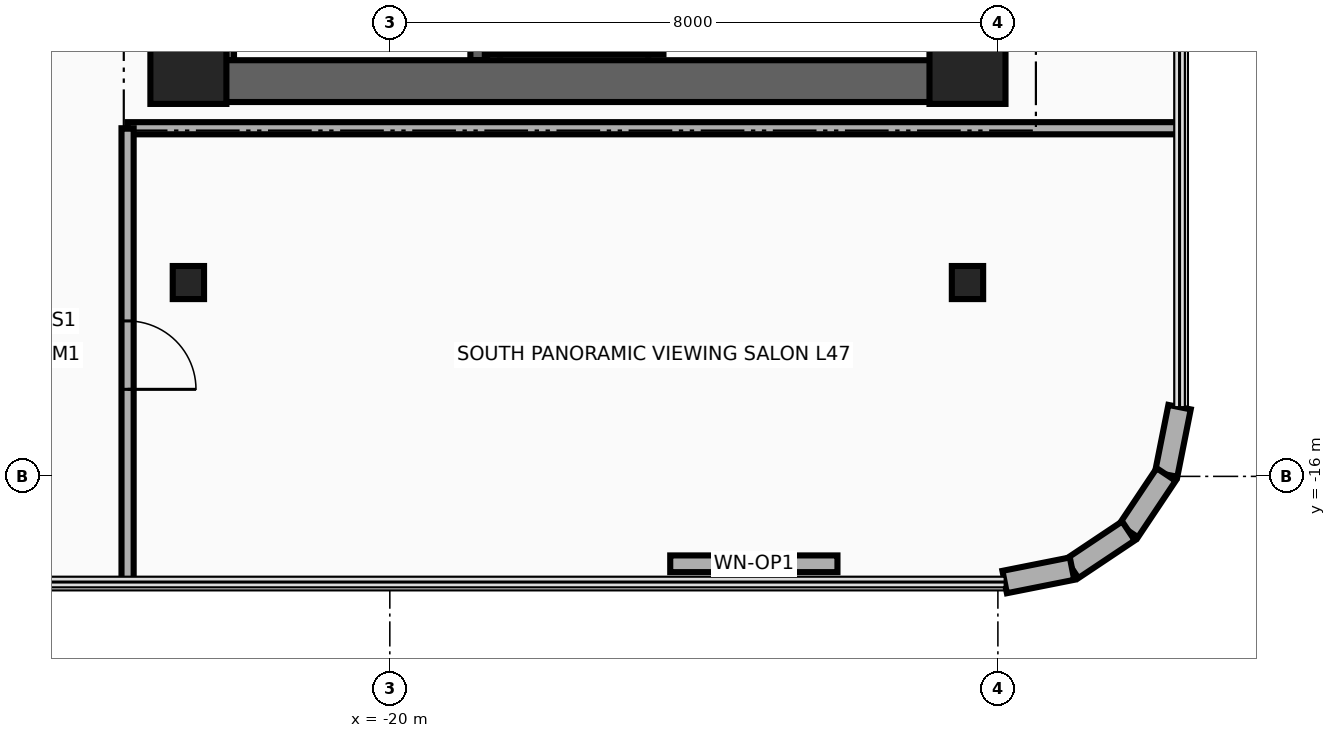
"""IFC4 building model, lengths in metres.
Left out: names, types, materials, properties, quantities, classifications, styles, units other than length and angle.
Written with IfcOpenShell. Run it as: python <this file> out.ifc"""

import sys

from ifc_helpers import new_model, si_unit, direction, frame, frame_2d, origin, origin_2d, place, context, subcontext, project, spatial, rectangle, i_section, extrude, source, transform, mapped, element, fill, save


model = new_model("IFC4")
c1 = context("Model", 3, precision=1e-05, world=origin(), true_north=direction((0.0, 1.0)))
c2 = subcontext(c1, "Body", "Model", "MODEL_VIEW")
j1 = project(units=[si_unit("LENGTHUNIT", "METRE"), si_unit("PLANEANGLEUNIT", "RADIAN")], contexts=[c1])
p1 = place(None, origin())
s1 = spatial("IfcSite", under=j1, at=p1, CompositionType="ELEMENT")
p2 = place(p1, origin())
s2 = spatial("IfcBuilding", under=s1, at=p2, CompositionType="ELEMENT")
p3 = place(p2, frame((0.0, 0.0, 184.45)))
s3 = spatial("IfcBuildingStorey", under=s2, at=p3, CompositionType="ELEMENT", Elevation=184.45)
for number, where, z_axis, x_axis in (
    (1, (-22.16, -10.525, 0.0), (0.0, 0.0, 1.0), (0.0, 1.0, 0.0)),
    (2, (-18.83, -10.525, 0.0), (0.0, 0.0, 1.0), (0.0, 1.0, 0.0)),
):
    element("IfcWall", number, at=place(p3, frame(where, z_axis=z_axis, x_axis=x_axis)), inside=s3, PredefinedType="SHEAR", context=c2, shape_type="SweptSolid", body=[
        extrude(rectangle(XDim=8.745, YDim=0.22, at=frame_2d((4.373, 0.0))), origin(), (0.0, 0.0, 1.0), 3.63),
    ])
p4 = place(p3, frame((-22.65, -11.075, 0.0), z_axis=(0.0, 0.0, 1.0), x_axis=(0.0, 1.0, 0.0)))
e3 = element("IfcWall", 3, at=p4, inside=s3, PredefinedType="SHEAR", context=c2, shape_type="SweptSolid", body=[
    extrude(rectangle(XDim=22.15, YDim=0.55, at=frame_2d((11.075, 0.0))), origin(), (0.0, 0.0, 1.0), 3.63),
])
p5 = place(p3, frame((-22.65, -10.8, 0.0), z_axis=(0.0, 0.0, 1.0), x_axis=(1.0, 0.0, 0.0)))
e4 = element("IfcWall", 4, at=p5, inside=s3, PredefinedType="SHEAR", context=c2, shape_type="SweptSolid", body=[
    extrude(rectangle(XDim=10.25, YDim=0.55, at=frame_2d((5.125, 0.0))), origin(), (0.0, 0.0, 1.0), 3.63),
])
m1 = source(origin(), c2, "Body", "SweptSolid", [
    extrude(rectangle(XDim=1.0, YDim=1.0, at=origin_2d()), origin(), (0.0, 0.0, 1.0), 3.95),
])
for number, where, z_axis, x_axis in (
    (5, (-22.65, -10.6, 0.0), (0.0, 0.0, 1.0), (1.0, 0.0, 0.0)),
    (6, (-12.4, -10.6, 0.0), (0.0, 0.0, 1.0), (1.0, 0.0, 0.0)),
):
    element("IfcColumn", number, at=place(p3, frame(where, z_axis=z_axis, x_axis=x_axis)), inside=s3, PredefinedType="COLUMN", context=c2, shape_type="MappedRepresentation", body=[
        mapped(m1, transform((0.0, 0.0, 0.0), x_axis=(1.0, 0.0, 0.0), y_axis=(0.0, 1.0, 0.0), z_axis=(0.0, 0.0, 1.0), scale=1.0)),
    ])
m2 = source(origin(), c2, "Body", "SweptSolid", [
    extrude(i_section(OverallWidth=0.412, OverallDepth=0.435, WebThickness=0.036, FlangeThickness=0.057, at=origin_2d()), origin(), (0.0, 0.0, 1.0), 3.95),
])
for number, where, z_axis, x_axis in (
    (7, (-22.65, -13.45, 0.0), (0.0, 0.0, 1.0), (1.0, 0.0, 0.0)),
    (8, (-12.4, -13.45, 0.0), (0.0, 0.0, 1.0), (1.0, 0.0, 0.0)),
):
    element("IfcColumn", number, at=place(p3, frame(where, z_axis=z_axis, x_axis=x_axis)), inside=s3, PredefinedType="COLUMN", context=c2, shape_type="MappedRepresentation", body=[
        mapped(m2, transform((0.0, 0.0, 0.0), x_axis=(1.0, 0.0, 0.0), y_axis=(0.0, 1.0, 0.0), z_axis=(0.0, 0.0, 1.0), scale=1.0)),
    ])
p6 = place(p3, frame((-9.61, -15.089, 0.0), z_axis=(0.0, 0.0, 1.0), x_axis=(-0.195025152871, -0.980798241101, 0.0)))
e9 = element("IfcWall", 9, at=p6, inside=s3, PredefinedType="SOLIDWALL", context=c2, shape_type="SweptSolid", body=[
    extrude(rectangle(XDim=0.904, YDim=0.3, at=frame_2d((0.452, 0.0))), origin(), (0.0, 0.0, 1.0), 3.63),
])
for number, where, z_axis, x_axis in (
    (10, (-9.786, -15.976, 0.0), (0.0, 0.0, 1.0), (-0.556, -0.832, 0.0)),
    (11, (-10.282, -16.718, 0.0), (0.0, 0.0, 1.0), (-0.832, -0.556, 0.0)),
):
    element("IfcWall", number, at=place(p3, frame(where, z_axis=z_axis, x_axis=x_axis)), inside=s3, PredefinedType="SOLIDWALL", context=c2, shape_type="SweptSolid", body=[
        extrude(rectangle(XDim=0.893, YDim=0.3, at=frame_2d((0.446, 0.0))), origin(), (0.0, 0.0, 1.0), 3.63),
    ])
p7 = place(p3, frame((-11.024, -17.214, 0.0), z_axis=(0.0, 0.0, 1.0), x_axis=(-0.980798241101, -0.195025152871, 0.0)))
e12 = element("IfcWall", 12, at=p7, inside=s3, PredefinedType="SOLIDWALL", context=c2, shape_type="SweptSolid", body=[
    extrude(rectangle(XDim=0.904, YDim=0.3, at=frame_2d((0.452, 0.0))), origin(), (0.0, 0.0, 1.0), 3.63),
])
p8 = place(p3, frame((-14.111, -17.15, 0.0), z_axis=(0.0, 0.0, 1.0), x_axis=(-1.0, 0.0, 0.0)))
e13 = element("IfcWall", 13, at=p8, inside=s3, PredefinedType="SOLIDWALL", context=c2, shape_type="SweptSolid", body=[
    extrude(rectangle(XDim=2.2, YDim=0.22, at=frame_2d((1.1, 0.0))), origin(), (0.0, 0.0, 1.0), 3.63),
])
p9 = place(p8, frame((0.65, 0.0, 0.95)))
e14 = element("IfcOpeningElement", 14, at=p9, cuts=e13, PredefinedType="OPENING", context=c2, shape_type="SweptSolid", body=[
    extrude(rectangle(XDim=0.9, YDim=1.3, at=frame_2d((0.45, 0.65))), frame((0.0, 0.125, 0.0), z_axis=(0.0, -1.0, 0.0), x_axis=(1.0, 0.0, 0.0)), (0.0, 0.0, 1.0), 0.25),
])
for number, where, z_axis, x_axis in (
    (15, (-18.65, -10.45, 0.0), (0.0, 0.0, 1.0), (0.0, 1.0, 0.0)),
    (16, (-16.5, -10.45, 0.0), (0.0, 0.0, 1.0), (0.0, 1.0, 0.0)),
):
    element("IfcWall", number, at=place(p3, frame(where, z_axis=z_axis, x_axis=x_axis)), inside=s3, PredefinedType="MOVABLE", context=c2, shape_type="SweptSolid", body=[
        extrude(rectangle(XDim=2.35, YDim=0.2, at=frame_2d((1.175, 0.0))), origin(), (0.0, 0.0, 1.0), 2.665),
    ])
p10 = place(p3, frame((-18.55, -10.35, 0.0), z_axis=(0.0, 0.0, 1.0), x_axis=(1.0, 0.0, 0.0)))
e17 = element("IfcWall", 17, at=p10, inside=s3, PredefinedType="MOVABLE", context=c2, shape_type="SweptSolid", body=[
    extrude(rectangle(XDim=1.95, YDim=0.2, at=frame_2d((0.975, 0.0))), origin(), (0.0, 0.0, 1.0), 2.665),
])
p11 = place(p3, frame((-23.45, -11.42, 0.0), z_axis=(0.0, 0.0, 1.0), x_axis=(1.0, 0.0, 0.0)))
e18 = element("IfcWall", 18, at=p11, inside=s3, PredefinedType="PARTITIONING", context=c2, shape_type="SweptSolid", body=[
    extrude(rectangle(XDim=13.84, YDim=0.16, at=frame_2d((6.92, 0.0))), origin(), (0.0, 0.0, 1.0), 3.004),
])
p12 = place(p3, frame((-23.45, -17.39, 0.0), z_axis=(0.0, 0.0, 1.0), x_axis=(0.0, 1.0, 0.0)))
e19 = element("IfcWall", 19, at=p12, inside=s3, PredefinedType="PARTITIONING", context=c2, shape_type="SweptSolid", body=[
    extrude(rectangle(XDim=5.97, YDim=0.16, at=frame_2d((2.985, 0.0))), origin(), (0.0, 0.0, 1.0), 3.63),
])
p13 = place(p12, frame((2.535, 0.0, 0.0)))
e20 = element("IfcOpeningElement", 20, at=p13, cuts=e19, PredefinedType="OPENING", context=c2, shape_type="SweptSolid", body=[
    extrude(rectangle(XDim=0.9, YDim=2.1, at=frame_2d((0.45, 1.05))), frame((0.0, 0.095, 0.0), z_axis=(0.0, -1.0, 0.0), x_axis=(1.0, 0.0, 0.0)), (0.0, 0.0, 1.0), 0.19),
])
p14 = place(p9, origin())
e21 = element("IfcWindow", 21, at=p14, inside=s3, PartitioningType="SINGLE_PANEL", PredefinedType="WINDOW", context=c2, shape_type="SweptSolid", body=[
    extrude(rectangle(XDim=0.9, YDim=1.3, at=frame_2d((0.45, 0.65))), frame((0.0, 0.03, 0.0), z_axis=(0.0, -1.0, 0.0), x_axis=(1.0, 0.0, 0.0)), (0.0, 0.0, 1.0), 0.06),
])
fill(e14, e21)
p15 = place(p13, frame((0.9, 0.0, 0.0), z_axis=(0.0, 0.0, 1.0), x_axis=(-1.0, 0.0, 0.0)))
e22 = element("IfcDoor", 22, at=p15, inside=s3, OperationType="SINGLE_SWING_LEFT", PredefinedType="DOOR", context=c2, shape_type="SweptSolid", body=[
    extrude(rectangle(XDim=0.9, YDim=2.1, at=frame_2d((0.45, 1.05))), frame((0.0, 0.025, 0.0), z_axis=(0.0, -1.0, 0.0), x_axis=(1.0, 0.0, 0.0)), (0.0, 0.0, 1.0), 0.05),
])
fill(e20, e22)
save(model, sys.argv[1])
